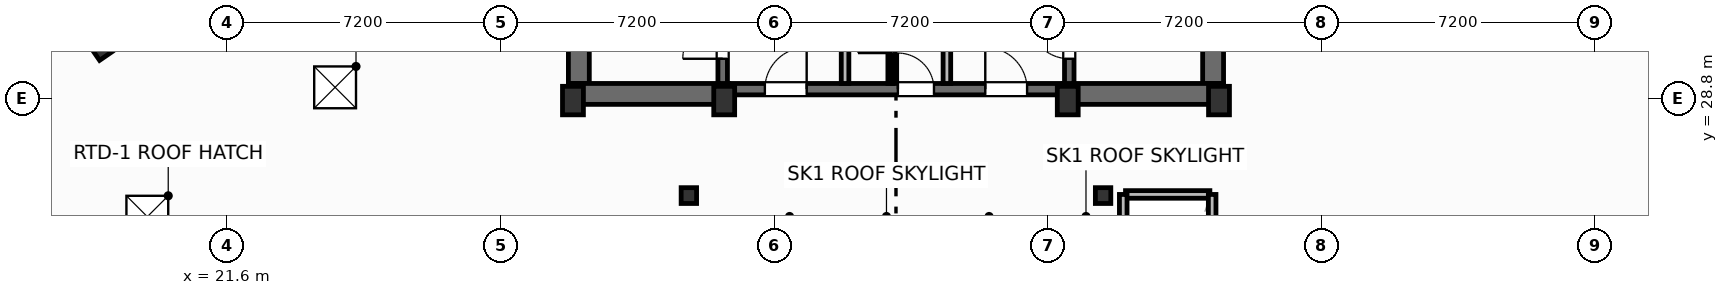
"""IFC4 building model, lengths in metres.
Left out: names, types, materials, properties, quantities, classifications, styles, units other than length and angle.
Written with IfcOpenShell. Run it as: python <this file> out.ifc"""

import sys

from ifc_helpers import new_model, si_unit, direction, frame, frame_2d, origin, origin_2d, place, context, subcontext, project, spatial, rectangle, i_section, extrude, element, fill, save


model = new_model("IFC4")
c1 = context("Model", 3, precision=1e-05, world=origin(), true_north=direction((0.0, 1.0)))
c2 = subcontext(c1, "Body", "Model", "MODEL_VIEW")
j1 = project(units=[si_unit("LENGTHUNIT", "METRE"), si_unit("PLANEANGLEUNIT", "RADIAN")], contexts=[c1])
p1 = place(None, origin())
s1 = spatial("IfcSite", under=j1, at=p1, CompositionType="ELEMENT")
p2 = place(p1, origin())
s2 = spatial("IfcBuilding", under=s1, at=p2, CompositionType="ELEMENT")
p3 = place(p2, frame((0.0, 0.0, 301.1)))
s3 = spatial("IfcBuildingStorey", under=s2, at=p3, CompositionType="ELEMENT", Elevation=301.1)
for number, where, z_axis, x_axis in (
    (1, (30.7, 28.75, 0.0), (0.0, 0.0, 1.0), (1.0, 0.0, 0.0)),
    (2, (34.68, 28.75, 0.0), (0.0, 0.0, 1.0), (1.0, 0.0, 0.0)),
    (3, (43.72, 28.75, 0.0), (0.0, 0.0, 1.0), (1.0, 0.0, 0.0)),
    (4, (47.7, 28.75, 0.0), (0.0, 0.0, 1.0), (1.0, 0.0, 0.0)),
):
    element("IfcColumn", number, at=place(p3, frame(where, z_axis=z_axis, x_axis=x_axis)), inside=s3, PredefinedType="COLUMN", context=c2, shape_type="SweptSolid", body=[
        extrude(rectangle(XDim=0.55, YDim=0.75, at=origin_2d()), origin(), (0.0, 0.0, 1.0), 4.8),
    ])
for number, where, z_axis, x_axis in (
    (5, (33.75, 26.25, 0.0), (0.0, 0.0, 1.0), (1.0, 0.0, 0.0)),
    (6, (44.65, 26.25, 0.0), (0.0, 0.0, 1.0), (1.0, 0.0, 0.0)),
):
    element("IfcColumn", number, at=place(p3, frame(where, z_axis=z_axis, x_axis=x_axis)), inside=s3, PredefinedType="COLUMN", context=c2, shape_type="SweptSolid", body=[
        extrude(i_section(OverallWidth=0.406, OverallDepth=0.416, WebThickness=0.03, FlangeThickness=0.048, FilletRadius=0.025, at=origin_2d()), origin(), (0.0, 0.0, 1.0), 4.8),
    ])
for number, where, z_axis, x_axis in (
    (7, (30.855, 29.2, 0.0), (0.0, 0.0, 1.0), (0.0, 1.0, 0.0)),
    (8, (47.545, 29.2, 0.0), (0.0, 0.0, 1.0), (0.0, 1.0, 0.0)),
):
    element("IfcWall", number, at=place(p3, frame(where, z_axis=z_axis, x_axis=x_axis)), inside=s3, PredefinedType="SHEAR", context=c2, shape_type="SweptSolid", body=[
        extrude(rectangle(XDim=9.22, YDim=0.55, at=frame_2d((4.61, 0.0))), origin(), (0.0, 0.0, 1.0), 4.55),
    ])
for number, where, z_axis, x_axis in (
    (9, (30.58, 28.925, 0.0), (0.0, 0.0, 1.0), (1.0, 0.0, 0.0)),
    (10, (43.6, 28.925, 0.0), (0.0, 0.0, 1.0), (1.0, 0.0, 0.0)),
):
    element("IfcWall", number, at=place(p3, frame(where, z_axis=z_axis, x_axis=x_axis)), inside=s3, PredefinedType="SHEAR", context=c2, shape_type="SweptSolid", body=[
        extrude(rectangle(XDim=4.22, YDim=0.55, at=frame_2d((2.11, 0.0))), origin(), (0.0, 0.0, 1.0), 4.55),
    ])
p4 = place(p3, frame((34.8, 29.05, 0.0), z_axis=(0.0, 0.0, 1.0), x_axis=(1.0, 0.0, 0.0)))
e11 = element("IfcWall", 11, at=p4, inside=s3, PredefinedType="SHEAR", context=c2, shape_type="SweptSolid", body=[
    extrude(rectangle(XDim=8.8, YDim=0.3, at=frame_2d((4.4, 0.0))), origin(), (0.0, 0.0, 1.0), 4.55),
])
p5 = place(p4, frame((0.95, 0.0, 0.0)))
e12 = element("IfcOpeningElement", 12, at=p5, cuts=e11, PredefinedType="OPENING", context=c2, shape_type="SweptSolid", body=[
    extrude(rectangle(XDim=1.1, YDim=2.15, at=frame_2d((0.55, 1.075))), frame((0.0, 0.16, 0.0), z_axis=(0.0, -1.0, 0.0), x_axis=(1.0, 0.0, 0.0)), (0.0, 0.0, 1.0), 0.32),
])
p6 = place(p4, frame((6.75, 0.0, 0.0)))
e13 = element("IfcOpeningElement", 13, at=p6, cuts=e11, PredefinedType="OPENING", context=c2, shape_type="SweptSolid", body=[
    extrude(rectangle(XDim=1.1, YDim=2.15, at=frame_2d((0.55, 1.075))), frame((0.0, 0.16, 0.0), z_axis=(0.0, -1.0, 0.0), x_axis=(1.0, 0.0, 0.0)), (0.0, 0.0, 1.0), 0.32),
])
p7 = place(p4, frame((4.45, 0.0, 0.0)))
e14 = element("IfcOpeningElement", 14, at=p7, cuts=e11, PredefinedType="OPENING", context=c2, shape_type="SweptSolid", body=[
    extrude(rectangle(XDim=0.95, YDim=2.15, at=frame_2d((0.475, 1.075))), frame((0.0, 0.16, 0.0), z_axis=(0.0, -1.0, 0.0), x_axis=(1.0, 0.0, 0.0)), (0.0, 0.0, 1.0), 0.32),
])
p8 = place(p3, frame((34.64, 29.2, 0.0), z_axis=(0.0, 0.0, 1.0), x_axis=(0.0, 1.0, 0.0)))
e15 = element("IfcWall", 15, at=p8, inside=s3, PredefinedType="SHEAR", context=c2, shape_type="SweptSolid", body=[
    extrude(rectangle(XDim=9.22, YDim=0.25, at=frame_2d((4.61, 0.0))), origin(), (0.0, 0.0, 1.0), 4.55),
])
p9 = place(p8, frame((0.65, 0.0, 0.0)))
e16 = element("IfcOpeningElement", 16, at=p9, cuts=e15, PredefinedType="OPENING", context=c2, shape_type="SweptSolid", body=[
    extrude(rectangle(XDim=1.05, YDim=2.15, at=frame_2d((0.525, 1.075))), frame((0.0, 0.135, 0.0), z_axis=(0.0, -1.0, 0.0), x_axis=(1.0, 0.0, 0.0)), (0.0, 0.0, 1.0), 0.27),
])
p10 = place(p3, frame((43.76, 29.2, 0.0), z_axis=(0.0, 0.0, 1.0), x_axis=(0.0, 1.0, 0.0)))
e17 = element("IfcWall", 17, at=p10, inside=s3, PredefinedType="SHEAR", context=c2, shape_type="SweptSolid", body=[
    extrude(rectangle(XDim=9.22, YDim=0.25, at=frame_2d((4.61, 0.0))), origin(), (0.0, 0.0, 1.0), 4.55),
])
p11 = place(p10, frame((0.65, 0.0, 0.0)))
e18 = element("IfcOpeningElement", 18, at=p11, cuts=e17, PredefinedType="OPENING", context=c2, shape_type="SweptSolid", body=[
    extrude(rectangle(XDim=1.05, YDim=2.15, at=frame_2d((0.525, 1.075))), frame((0.0, 0.135, 0.0), z_axis=(0.0, -1.0, 0.0), x_axis=(1.0, 0.0, 0.0)), (0.0, 0.0, 1.0), 0.27),
])
p12 = place(p3, frame((18.296, 30.086, 0.0), z_axis=(0.0, 0.0, 1.0), x_axis=(0.823532597628, 0.567268949127, 0.0)))
e19 = element("IfcColumn", 19, at=p12, inside=s3, PredefinedType="COLUMN", context=c2, shape_type="SweptSolid", body=[
    extrude(i_section(OverallWidth=0.401, OverallDepth=0.399, WebThickness=0.025, FlangeThickness=0.04, FilletRadius=0.022, at=origin_2d()), origin(), (0.0, 0.0, 1.0), 4.8),
])
p13 = place(p3, frame((44.448, 49.412, 0.0), z_axis=(0.0, 0.0, 1.0), x_axis=(-0.823531813074, -0.567270088102, 0.0)))
e20 = element("IfcWall", 20, at=p13, inside=s3, PredefinedType="SOLIDWALL", context=c2, shape_type="SweptSolid", body=[
    extrude(rectangle(XDim=36.01, YDim=0.24, at=frame_2d((18.005, 0.0))), origin(), (0.0, 0.0, 1.0), 3.83),
])
for number, where, z_axis, x_axis in (
    (21, (37.86, 29.2, 0.0), (0.0, 0.0, 1.0), (0.0, 1.0, 0.0)),
    (22, (40.54, 29.2, 0.0), (0.0, 0.0, 1.0), (0.0, 1.0, 0.0)),
):
    element("IfcWall", number, at=place(p3, frame(where, z_axis=z_axis, x_axis=x_axis)), inside=s3, PredefinedType="PARTITIONING", context=c2, shape_type="SweptSolid", body=[
        extrude(rectangle(XDim=5.18, YDim=0.2, at=frame_2d((2.59, 0.0))), origin(), (0.0, 0.0, 1.0), 4.55),
    ])
p14 = place(p3, frame((39.05, 29.2, 0.0), z_axis=(0.0, 0.0, 1.0), x_axis=(0.0, 1.0, 0.0)))
e23 = element("IfcWall", 23, at=p14, inside=s3, PredefinedType="PARTITIONING", context=c2, shape_type="SweptSolid", body=[
    extrude(rectangle(XDim=5.22, YDim=0.125, at=frame_2d((2.61, 0.0))), origin(), (0.0, 0.0, 1.0), 4.55),
])
p15 = place(p14, frame((0.8, 0.0, 0.0)))
e24 = element("IfcOpeningElement", 24, at=p15, cuts=e23, PredefinedType="OPENING", context=c2, shape_type="SweptSolid", body=[
    extrude(rectangle(XDim=0.85, YDim=2.05, at=frame_2d((0.425, 1.025))), frame((0.0, 0.073, 0.0), z_axis=(0.0, -1.0, 0.0), x_axis=(1.0, 0.0, 0.0)), (0.0, 0.0, 1.0), 0.145),
])
p16 = place(p14, frame((3.4, 0.0, 0.0)))
e25 = element("IfcOpeningElement", 25, at=p16, cuts=e23, PredefinedType="OPENING", context=c2, shape_type="SweptSolid", body=[
    extrude(rectangle(XDim=0.85, YDim=2.05, at=frame_2d((0.425, 1.025))), frame((0.0, 0.073, 0.0), z_axis=(0.0, -1.0, 0.0), x_axis=(1.0, 0.0, 0.0)), (0.0, 0.0, 1.0), 0.145),
])
p17 = place(p3, frame((45.24, 26.28, 0.0), z_axis=(0.0, 0.0, 1.0), x_axis=(1.0, 0.0, 0.0)))
e26 = element("IfcWall", 26, at=p17, inside=s3, PredefinedType="PARTITIONING", context=c2, shape_type="SweptSolid", body=[
    extrude(rectangle(XDim=2.22, YDim=0.2, at=frame_2d((1.11, 0.0))), origin(), (0.0, 0.0, 1.0), 4.55),
])
for number, where, z_axis, x_axis in (
    (27, (45.18, 19.38, 0.0), (0.0, 0.0, 1.0), (0.0, 1.0, 0.0)),
    (28, (47.52, 19.38, 0.0), (0.0, 0.0, 1.0), (0.0, 1.0, 0.0)),
):
    element("IfcWall", number, at=place(p3, frame(where, z_axis=z_axis, x_axis=x_axis)), inside=s3, PredefinedType="PARTITIONING", context=c2, shape_type="SweptSolid", body=[
        extrude(rectangle(XDim=6.9, YDim=0.2, at=frame_2d((3.45, 0.0))), origin(), (0.0, 0.0, 1.0), 4.55),
    ])
p18 = place(p3, frame((0.0, 0.0, -0.25)))
p19 = place(p18, frame((19.5, 25.694, 0.0)))
p20 = place(p19, frame((0.0, 0.0, 0.2)))
e29 = element("IfcDoor", 29, at=p20, inside=s3, OperationType="SINGLE_SWING_LEFT", PredefinedType="TRAPDOOR", context=c2, shape_type="SweptSolid", body=[
    extrude(rectangle(XDim=1.1, YDim=1.1, at=origin_2d()), origin(), (0.0, 0.0, 1.0), 0.05),
])
p21 = place(p18, frame((24.441, 29.098, 0.0)))
p22 = place(p21, frame((0.0, 0.0, 0.2)))
e30 = element("IfcDoor", 30, at=p22, inside=s3, OperationType="SINGLE_SWING_LEFT", PredefinedType="TRAPDOOR", context=c2, shape_type="SweptSolid", body=[
    extrude(rectangle(XDim=1.1, YDim=1.1, at=origin_2d()), origin(), (0.0, 0.0, 1.0), 0.05),
])
p23 = place(p9, origin())
e31 = element("IfcDoor", 31, at=p23, inside=s3, OperationType="SINGLE_SWING_LEFT", PredefinedType="DOOR", context=c2, shape_type="SweptSolid", body=[
    extrude(rectangle(XDim=1.05, YDim=2.15, at=frame_2d((0.525, 1.075))), frame((0.0, 0.025, 0.0), z_axis=(0.0, -1.0, 0.0), x_axis=(1.0, 0.0, 0.0)), (0.0, 0.0, 1.0), 0.05),
])
fill(e16, e31)
p24 = place(p11, origin())
e32 = element("IfcDoor", 32, at=p24, inside=s3, OperationType="SINGLE_SWING_RIGHT", PredefinedType="DOOR", context=c2, shape_type="SweptSolid", body=[
    extrude(rectangle(XDim=1.05, YDim=2.15, at=frame_2d((0.525, 1.075))), frame((0.0, 0.025, 0.0), z_axis=(0.0, -1.0, 0.0), x_axis=(1.0, 0.0, 0.0)), (0.0, 0.0, 1.0), 0.05),
])
fill(e18, e32)
p25 = place(p5, origin())
e33 = element("IfcDoor", 33, at=p25, inside=s3, OperationType="SINGLE_SWING_RIGHT", PredefinedType="DOOR", context=c2, shape_type="SweptSolid", body=[
    extrude(rectangle(XDim=1.1, YDim=2.15, at=frame_2d((0.55, 1.075))), frame((0.0, 0.025, 0.0), z_axis=(0.0, -1.0, 0.0), x_axis=(1.0, 0.0, 0.0)), (0.0, 0.0, 1.0), 0.05),
])
fill(e12, e33)
p26 = place(p6, origin())
e34 = element("IfcDoor", 34, at=p26, inside=s3, OperationType="SINGLE_SWING_LEFT", PredefinedType="DOOR", context=c2, shape_type="SweptSolid", body=[
    extrude(rectangle(XDim=1.1, YDim=2.15, at=frame_2d((0.55, 1.075))), frame((0.0, 0.025, 0.0), z_axis=(0.0, -1.0, 0.0), x_axis=(1.0, 0.0, 0.0)), (0.0, 0.0, 1.0), 0.05),
])
fill(e13, e34)
p27 = place(p15, origin())
e35 = element("IfcDoor", 35, at=p27, inside=s3, OperationType="SINGLE_SWING_LEFT", PredefinedType="DOOR", context=c2, shape_type="SweptSolid", body=[
    extrude(rectangle(XDim=0.85, YDim=2.05, at=frame_2d((0.425, 1.025))), frame((0.0, 0.025, 0.0), z_axis=(0.0, -1.0, 0.0), x_axis=(1.0, 0.0, 0.0)), (0.0, 0.0, 1.0), 0.05),
])
fill(e24, e35)
p28 = place(p7, origin())
e36 = element("IfcDoor", 36, at=p28, inside=s3, OperationType="SINGLE_SWING_LEFT", PredefinedType="DOOR", context=c2, shape_type="SweptSolid", body=[
    extrude(rectangle(XDim=0.95, YDim=2.15, at=frame_2d((0.475, 1.075))), frame((0.0, 0.025, 0.0), z_axis=(0.0, -1.0, 0.0), x_axis=(1.0, 0.0, 0.0)), (0.0, 0.0, 1.0), 0.05),
])
fill(e14, e36)
save(model, sys.argv[1])
